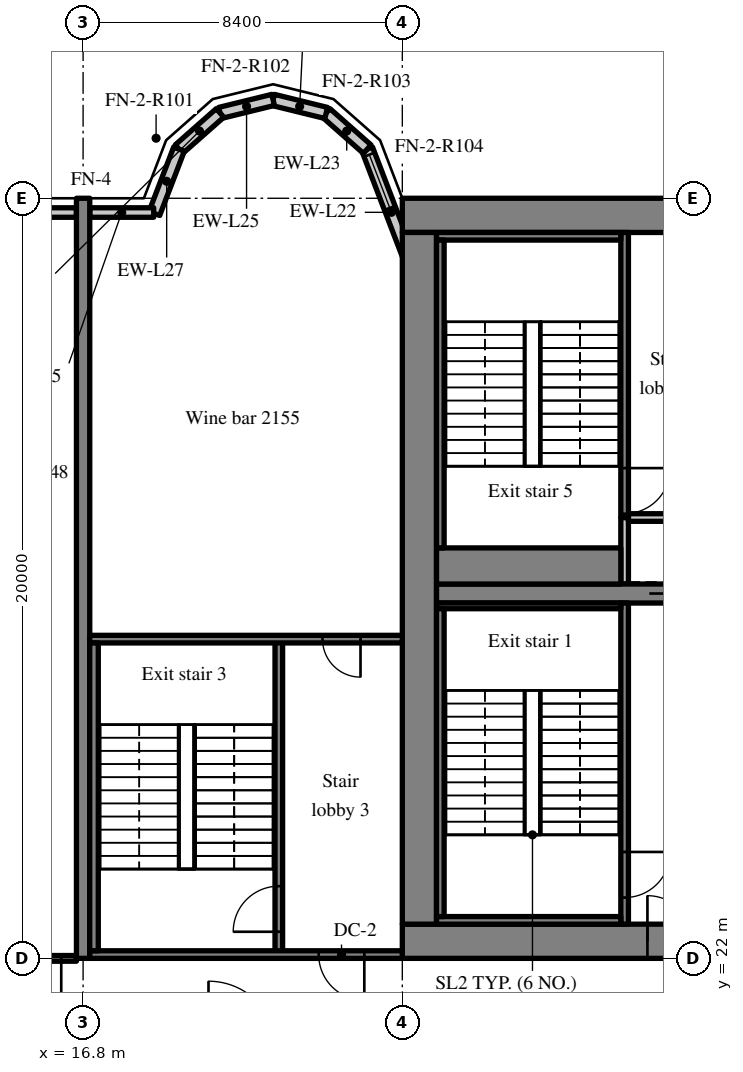
"""IFC4 building model, lengths in metres.
Left out: names, types, materials, properties, quantities, classifications, styles, units other than length and angle.
Written with IfcOpenShell. Run it as: python <this file> out.ifc"""

import sys

from ifc_helpers import new_model, si_unit, direction, frame, frame_2d, origin, place, context, subcontext, project, spatial, rectangle, extrude, source, transform, mapped, element, fill, save


model = new_model("IFC4")
c1 = context("Model", 3, precision=1e-05, world=origin(), true_north=direction((0.0, 1.0)))
c2 = subcontext(c1, "Body", "Model", "MODEL_VIEW")
j1 = project(units=[si_unit("LENGTHUNIT", "METRE"), si_unit("PLANEANGLEUNIT", "RADIAN")], contexts=[c1])
p1 = place(None, origin())
s1 = spatial("IfcSite", under=j1, at=p1, CompositionType="ELEMENT")
p2 = place(p1, origin())
s2 = spatial("IfcBuilding", under=s1, at=p2, CompositionType="ELEMENT")
p3 = place(p2, frame((0.0, 0.0, 91.4)))
s3 = spatial("IfcBuildingStorey", under=s2, at=p3, CompositionType="ELEMENT", Elevation=91.4)
m1 = source(origin(), c2, "Body", "SweptSolid", [
    extrude(rectangle(XDim=50.4, YDim=0.9, at=frame_2d((25.2, 0.0))), origin(), (0.0, 0.0, 1.0), 3.52),
])
p4 = place(p3, frame((25.2, 22.45, 0.0), z_axis=(0.0, 0.0, 1.0), x_axis=(1.0, 0.0, 0.0)))
e1 = element("IfcWall", 1, at=p4, inside=s3, PredefinedType="SHEAR", context=c2, shape_type="MappedRepresentation", body=[
    mapped(m1, transform((0.0, 0.0, 0.0), scale=1.0)),
])
m2 = source(origin(), c2, "Body", "SweptSolid", [
    extrude(rectangle(XDim=1.8, YDim=2.1, at=frame_2d((0.9, 1.05))), frame((0.0, 0.46, 0.0), z_axis=(0.0, -1.0, 0.0), x_axis=(1.0, 0.0, 0.0)), (0.0, 0.0, 1.0), 0.92),
])
p5 = place(p4, frame((15.9, 0.0, 0.0)))
e2 = element("IfcOpeningElement", 2, at=p5, cuts=e1, PredefinedType="OPENING", context=c2, shape_type="MappedRepresentation", body=[
    mapped(m2, transform((0.0, 0.0, 0.0), scale=1.0)),
])
m3 = source(origin(), c2, "Body", "SweptSolid", [
    extrude(rectangle(XDim=1.2, YDim=2.1, at=frame_2d((0.6, 1.05))), frame((0.0, 0.46, 0.0), z_axis=(0.0, -1.0, 0.0), x_axis=(1.0, 0.0, 0.0)), (0.0, 0.0, 1.0), 0.92),
])
p6 = place(p4, frame((26.975, 0.0, 0.0)))
e3 = element("IfcOpeningElement", 3, at=p6, cuts=e1, PredefinedType="OPENING", context=c2, shape_type="MappedRepresentation", body=[
    mapped(m3, transform((0.0, 0.0, 0.0), scale=1.0)),
])
m4 = source(origin(), c2, "Body", "SweptSolid", [
    extrude(rectangle(XDim=0.9, YDim=2.1, at=frame_2d((0.45, 1.05))), frame((0.0, 0.46, 0.0), z_axis=(0.0, -1.0, 0.0), x_axis=(1.0, 0.0, 0.0)), (0.0, 0.0, 1.0), 0.92),
])
p7 = place(p4, frame((34.5, 0.0, 0.0)))
e4 = element("IfcOpeningElement", 4, at=p7, cuts=e1, PredefinedType="OPENING", context=c2, shape_type="MappedRepresentation", body=[
    mapped(m4, transform((0.0, 0.0, 0.0), scale=1.0)),
])
p8 = place(p4, frame((31.5, 0.0, 0.0)))
e5 = element("IfcOpeningElement", 5, at=p8, cuts=e1, PredefinedType="OPENING", context=c2, shape_type="MappedRepresentation", body=[
    mapped(m4, transform((0.0, 0.0, 0.0), scale=1.0)),
])
p9 = place(p4, frame((39.788, 0.0, 0.0)))
e6 = element("IfcOpeningElement", 6, at=p9, cuts=e1, PredefinedType="OPENING", context=c2, shape_type="MappedRepresentation", body=[
    mapped(m4, transform((0.0, 0.0, 0.0), scale=1.0)),
])
p10 = place(p4, frame((36.762, 0.0, 0.0)))
e7 = element("IfcOpeningElement", 7, at=p10, cuts=e1, PredefinedType="OPENING", context=c2, shape_type="MappedRepresentation", body=[
    mapped(m4, transform((0.0, 0.0, 0.0), scale=1.0)),
])
p11 = place(p4, frame((6.45, 0.0, 0.0)))
e8 = element("IfcOpeningElement", 8, at=p11, cuts=e1, PredefinedType="OPENING", context=c2, shape_type="MappedRepresentation", body=[
    mapped(m3, transform((0.0, 0.0, 0.0), scale=1.0)),
])
p12 = place(p4, frame((47.775, 0.0, 0.0)))
e9 = element("IfcOpeningElement", 9, at=p12, cuts=e1, PredefinedType="OPENING", context=c2, shape_type="MappedRepresentation", body=[
    mapped(m3, transform((0.0, 0.0, 0.0), scale=1.0)),
])
p13 = place(p3, frame((25.2, 41.55, 0.0), z_axis=(0.0, 0.0, 1.0), x_axis=(1.0, 0.0, 0.0)))
e10 = element("IfcWall", 10, at=p13, inside=s3, PredefinedType="SHEAR", context=c2, shape_type="MappedRepresentation", body=[
    mapped(m1, transform((0.0, 0.0, 0.0), scale=1.0)),
])
m5 = source(origin(), c2, "Body", "SweptSolid", [
    extrude(rectangle(XDim=18.2, YDim=0.9, at=frame_2d((9.1, 0.0))), origin(), (0.0, 0.0, 1.0), 3.52),
])
p14 = place(p3, frame((25.65, 22.9, 0.0), z_axis=(0.0, 0.0, 1.0), x_axis=(0.0, 1.0, 0.0)))
e11 = element("IfcWall", 11, at=p14, inside=s3, PredefinedType="SHEAR", context=c2, shape_type="MappedRepresentation", body=[
    mapped(m5, transform((0.0, 0.0, 0.0), scale=1.0)),
])
m6 = source(origin(), c2, "Body", "SweptSolid", [
    extrude(rectangle(XDim=7.25, YDim=0.5, at=frame_2d((3.625, 0.0))), origin(), (0.0, 0.0, 1.0), 3.52),
])
p15 = place(p3, frame((26.1, 31.6, 0.0), z_axis=(0.0, 0.0, 1.0), x_axis=(1.0, 0.0, 0.0)))
e12 = element("IfcWall", 12, at=p15, inside=s3, PredefinedType="SHEAR", context=c2, shape_type="MappedRepresentation", body=[
    mapped(m6, transform((0.0, 0.0, 0.0), scale=1.0)),
])
m7 = source(origin(), c2, "Body", "SweptSolid", [
    extrude(rectangle(XDim=1.1, YDim=2.1, at=frame_2d((0.55, 1.05))), frame((0.0, 0.26, 0.0), z_axis=(0.0, -1.0, 0.0), x_axis=(1.0, 0.0, 0.0)), (0.0, 0.0, 1.0), 0.52),
])
p16 = place(p15, frame((5.6, 0.0, 0.0)))
e13 = element("IfcOpeningElement", 13, at=p16, cuts=e12, PredefinedType="OPENING", context=c2, shape_type="MappedRepresentation", body=[
    mapped(m7, transform((0.0, 0.0, 0.0), scale=1.0)),
])
m8 = source(origin(), c2, "Body", "SweptSolid", [
    extrude(rectangle(XDim=20.0, YDim=0.35, at=frame_2d((10.0, 0.0))), origin(), (0.0, 0.0, 1.0), 3.52),
])
p17 = place(p3, frame((16.8, 22.0, 0.0), z_axis=(0.0, 0.0, 1.0), x_axis=(0.0, 1.0, 0.0)))
e14 = element("IfcWall", 14, at=p17, inside=s3, PredefinedType="SHEAR", context=c2, shape_type="MappedRepresentation", body=[
    mapped(m8, transform((0.0, 0.0, 0.0), scale=1.0)),
])
m9 = source(origin(), c2, "Body", "SweptSolid", [
    extrude(rectangle(XDim=3.559, YDim=0.3, at=frame_2d((1.78, 0.0))), origin(), (0.0, 0.0, 1.0), 3.52),
])
p18 = place(p3, frame((25.55, 39.969, 0.0), z_axis=(0.0, 0.0, 1.0), x_axis=(-0.35779745313, 0.933799219604, 0.0)))
e15 = element("IfcWall", 15, at=p18, inside=s3, PredefinedType="SOLIDWALL", context=c2, shape_type="MappedRepresentation", body=[
    mapped(m9, transform((0.0, 0.0, 0.0), scale=1.0)),
])
m10 = source(origin(), c2, "Body", "SweptSolid", [
    extrude(rectangle(XDim=1.5, YDim=2.0, at=frame_2d((0.75, 1.0))), frame((0.0, 0.16, 0.0), z_axis=(0.0, -1.0, 0.0), x_axis=(1.0, 0.0, 0.0)), (0.0, 0.0, 1.0), 0.32),
])
p19 = place(p18, frame((1.903, 0.0, 0.9)))
e16 = element("IfcOpeningElement", 16, at=p19, cuts=e15, PredefinedType="OPENING", context=c2, shape_type="MappedRepresentation", body=[
    mapped(m10, transform((0.0, 0.0, 0.0), scale=1.0)),
])
m11 = source(origin(), c2, "Body", "SweptSolid", [
    extrude(rectangle(XDim=1.44, YDim=0.3, at=frame_2d((0.72, 0.0))), origin(), (0.0, 0.0, 1.0), 3.52),
])
p20 = place(p3, frame((24.277, 43.292, 0.0), z_axis=(0.0, 0.0, 1.0), x_axis=(-0.749649827867, 0.661834673902, 0.0)))
e17 = element("IfcWall", 17, at=p20, inside=s3, PredefinedType="SOLIDWALL", context=c2, shape_type="MappedRepresentation", body=[
    mapped(m11, transform((0.0, 0.0, 0.0), scale=1.0)),
])
m12 = source(origin(), c2, "Body", "SweptSolid", [
    extrude(rectangle(XDim=1.438, YDim=0.3, at=frame_2d((0.719, 0.0))), origin(), (0.0, 0.0, 1.0), 3.52),
])
p21 = place(p3, frame((23.197, 44.245, 0.0), z_axis=(0.0, 0.0, 1.0), x_axis=(-0.971152283879, 0.238460146601, 0.0)))
e18 = element("IfcWall", 18, at=p21, inside=s3, PredefinedType="SOLIDWALL", context=c2, shape_type="MappedRepresentation", body=[
    mapped(m12, transform((0.0, 0.0, 0.0), scale=1.0)),
])
m13 = source(origin(), c2, "Body", "SweptSolid", [
    extrude(rectangle(XDim=1.439, YDim=0.3, at=frame_2d((0.719, 0.0))), origin(), (0.0, 0.0, 1.0), 3.52),
])
p22 = place(p3, frame((21.8, 44.588, 0.0), z_axis=(0.0, 0.0, 1.0), x_axis=(-0.971161932466, -0.238420848351, 0.0)))
e19 = element("IfcWall", 19, at=p22, inside=s3, PredefinedType="SOLIDWALL", context=c2, shape_type="MappedRepresentation", body=[
    mapped(m13, transform((0.0, 0.0, 0.0), scale=1.0)),
])
m14 = source(origin(), c2, "Body", "SweptSolid", [
    extrude(rectangle(XDim=1.44, YDim=0.3, at=frame_2d((0.72, 0.0))), origin(), (0.0, 0.0, 1.0), 3.52),
])
p23 = place(p3, frame((20.403, 44.245, 0.0), z_axis=(0.0, 0.0, 1.0), x_axis=(-0.74957555648, -0.661918790432, 0.0)))
e20 = element("IfcWall", 20, at=p23, inside=s3, PredefinedType="SOLIDWALL", context=c2, shape_type="MappedRepresentation", body=[
    mapped(m14, transform((0.0, 0.0, 0.0), scale=1.0)),
])
m15 = source(origin(), c2, "Body", "SweptSolid", [
    extrude(rectangle(XDim=1.812, YDim=0.3, at=frame_2d((0.906, 0.0))), origin(), (0.0, 0.0, 1.0), 3.52),
])
p24 = place(p3, frame((19.323, 43.292, 0.0), z_axis=(0.0, 0.0, 1.0), x_axis=(-0.357877270961, -0.93376863244, 0.0)))
e21 = element("IfcWall", 21, at=p24, inside=s3, PredefinedType="SOLIDWALL", context=c2, shape_type="MappedRepresentation", body=[
    mapped(m15, transform((0.0, 0.0, 0.0), scale=1.0)),
])
m16 = source(origin(), c2, "Body", "SweptSolid", [
    extrude(rectangle(XDim=3.675, YDim=0.25, at=frame_2d((1.837, 0.0))), origin(), (0.0, 0.0, 1.0), 2.82),
])
p25 = place(p3, frame((16.625, 41.625, 0.0), z_axis=(0.0, 0.0, 1.0), x_axis=(-1.0, 0.0, 0.0)))
e22 = element("IfcWall", 22, at=p25, inside=s3, PredefinedType="SOLIDWALL", context=c2, shape_type="MappedRepresentation", body=[
    mapped(m16, transform((0.0, 0.0, 0.0), scale=1.0)),
])
m17 = source(origin(), c2, "Body", "SweptSolid", [
    extrude(rectangle(XDim=1.5, YDim=1.5, at=frame_2d((0.75, 0.75))), frame((0.0, 0.135, 0.0), z_axis=(0.0, -1.0, 0.0), x_axis=(1.0, 0.0, 0.0)), (0.0, 0.0, 1.0), 0.27),
])
p26 = place(p25, frame((1.087, 0.0, 0.9)))
e23 = element("IfcOpeningElement", 23, at=p26, cuts=e22, PredefinedType="OPENING", context=c2, shape_type="MappedRepresentation", body=[
    mapped(m17, transform((0.0, 0.0, 0.0), scale=1.0)),
])
m18 = source(origin(), c2, "Body", "SweptSolid", [
    extrude(rectangle(XDim=1.683, YDim=0.25, at=frame_2d((0.841, 0.0))), origin(), (0.0, 0.0, 1.0), 2.82),
])
p27 = place(p3, frame((18.658, 41.625, 0.0), z_axis=(0.0, 0.0, 1.0), x_axis=(-1.0, 0.0, 0.0)))
e24 = element("IfcWall", 24, at=p27, inside=s3, PredefinedType="SOLIDWALL", context=c2, shape_type="MappedRepresentation", body=[
    mapped(m18, transform((0.0, 0.0, 0.0), scale=1.0)),
])
m19 = source(origin(), c2, "Body", "SweptSolid", [
    extrude(rectangle(XDim=8.45, YDim=0.2, at=frame_2d((4.225, 0.0))), origin(), (0.0, 0.0, 1.0), 3.52),
])
p28 = place(p3, frame((31.05, 22.9, 0.0), z_axis=(0.0, 0.0, 1.0), x_axis=(0.0, 1.0, 0.0)))
e25 = element("IfcWall", 25, at=p28, inside=s3, PredefinedType="SOLIDWALL", context=c2, shape_type="MappedRepresentation", body=[
    mapped(m19, transform((0.0, 0.0, 0.0), scale=1.0)),
])
m20 = source(origin(), c2, "Body", "SweptSolid", [
    extrude(rectangle(XDim=1.2, YDim=2.1, at=frame_2d((0.6, 1.05))), frame((0.0, 0.11, 0.0), z_axis=(0.0, -1.0, 0.0), x_axis=(1.0, 0.0, 0.0)), (0.0, 0.0, 1.0), 0.22),
])
p29 = place(p28, frame((0.7, 0.0, 0.0)))
e26 = element("IfcOpeningElement", 26, at=p29, cuts=e25, PredefinedType="OPENING", context=c2, shape_type="MappedRepresentation", body=[
    mapped(m20, transform((0.0, 0.0, 0.0), scale=1.0)),
])
m21 = source(origin(), c2, "Body", "SweptSolid", [
    extrude(rectangle(XDim=1.75, YDim=0.2, at=frame_2d((0.875, 0.0))), origin(), (0.0, 0.0, 1.0), 3.52),
])
p30 = place(p3, frame((31.05, 31.85, 0.0), z_axis=(0.0, 0.0, 1.0), x_axis=(0.0, 1.0, 0.0)))
e27 = element("IfcWall", 27, at=p30, inside=s3, PredefinedType="SOLIDWALL", context=c2, shape_type="MappedRepresentation", body=[
    mapped(m21, transform((0.0, 0.0, 0.0), scale=1.0)),
])
m22 = source(origin(), c2, "Body", "SweptSolid", [
    extrude(rectangle(XDim=2.2, YDim=0.2, at=frame_2d((1.1, 0.0))), origin(), (0.0, 0.0, 1.0), 3.52),
])
p31 = place(p3, frame((31.15, 33.6, 0.0), z_axis=(0.0, 0.0, 1.0), x_axis=(1.0, 0.0, 0.0)))
e28 = element("IfcWall", 28, at=p31, inside=s3, PredefinedType="SOLIDWALL", context=c2, shape_type="MappedRepresentation", body=[
    mapped(m22, transform((0.0, 0.0, 0.0), scale=1.0)),
])
m23 = source(origin(), c2, "Body", "SweptSolid", [
    extrude(rectangle(XDim=7.5, YDim=0.2, at=frame_2d((3.75, 0.0))), origin(), (0.0, 0.0, 1.0), 3.52),
])
p32 = place(p3, frame((31.05, 33.6, 0.0), z_axis=(0.0, 0.0, 1.0), x_axis=(0.0, 1.0, 0.0)))
e29 = element("IfcWall", 29, at=p32, inside=s3, PredefinedType="SOLIDWALL", context=c2, shape_type="MappedRepresentation", body=[
    mapped(m23, transform((0.0, 0.0, 0.0), scale=1.0)),
])
p33 = place(p32, frame((0.1, 0.0, 0.0)))
e30 = element("IfcOpeningElement", 30, at=p33, cuts=e29, PredefinedType="OPENING", context=c2, shape_type="MappedRepresentation", body=[
    mapped(m20, transform((0.0, 0.0, 0.0), scale=1.0)),
])
m24 = source(origin(), c2, "Body", "SweptSolid", [
    extrude(rectangle(XDim=8.3, YDim=0.2, at=frame_2d((4.15, 0.0))), origin(), (0.0, 0.0, 1.0), 3.52),
])
p34 = place(p3, frame((21.95, 22.1, 0.0), z_axis=(0.0, 0.0, 1.0), x_axis=(0.0, 1.0, 0.0)))
e31 = element("IfcWall", 31, at=p34, inside=s3, PredefinedType="SOLIDWALL", context=c2, shape_type="MappedRepresentation", body=[
    mapped(m24, transform((0.0, 0.0, 0.0), scale=1.0)),
])
p35 = place(p34, frame((0.6, 0.0, 0.0)))
e32 = element("IfcOpeningElement", 32, at=p35, cuts=e31, PredefinedType="OPENING", context=c2, shape_type="MappedRepresentation", body=[
    mapped(m20, transform((0.0, 0.0, 0.0), scale=1.0)),
])
m25 = source(origin(), c2, "Body", "SweptSolid", [
    extrude(rectangle(XDim=8.225, YDim=0.2, at=frame_2d((4.112, 0.0))), origin(), (0.0, 0.0, 1.0), 3.52),
])
p36 = place(p3, frame((16.975, 22.1, 0.0), z_axis=(0.0, 0.0, 1.0), x_axis=(1.0, 0.0, 0.0)))
e33 = element("IfcWall", 33, at=p36, inside=s3, PredefinedType="SOLIDWALL", context=c2, shape_type="MappedRepresentation", body=[
    mapped(m25, transform((0.0, 0.0, 0.0), scale=1.0)),
])
p37 = place(p36, frame((6.025, 0.0, 0.0)))
e34 = element("IfcOpeningElement", 34, at=p37, cuts=e33, PredefinedType="OPENING", context=c2, shape_type="MappedRepresentation", body=[
    mapped(m20, transform((0.0, 0.0, 0.0), scale=1.0)),
])
p38 = place(p3, frame((16.975, 30.4, 0.0), z_axis=(0.0, 0.0, 1.0), x_axis=(1.0, 0.0, 0.0)))
e35 = element("IfcWall", 35, at=p38, inside=s3, PredefinedType="SOLIDWALL", context=c2, shape_type="MappedRepresentation", body=[
    mapped(m25, transform((0.0, 0.0, 0.0), scale=1.0)),
])
m26 = source(origin(), c2, "Body", "SweptSolid", [
    extrude(rectangle(XDim=1.0, YDim=2.1, at=frame_2d((0.5, 1.05))), frame((0.0, 0.11, 0.0), z_axis=(0.0, -1.0, 0.0), x_axis=(1.0, 0.0, 0.0)), (0.0, 0.0, 1.0), 0.22),
])
p39 = place(p38, frame((6.125, 0.0, 0.0)))
e36 = element("IfcOpeningElement", 36, at=p39, cuts=e35, PredefinedType="OPENING", context=c2, shape_type="MappedRepresentation", body=[
    mapped(m26, transform((0.0, 0.0, 0.0), scale=1.0)),
])
m27 = source(origin(), c2, "Body", "SweptSolid", [
    extrude(rectangle(XDim=4.85, YDim=0.2, at=frame_2d((2.425, 0.0))), origin(), (0.0, 0.0, 1.0), 3.52),
])
p40 = place(p3, frame((26.1, 23.0, 0.0), z_axis=(0.0, 0.0, 1.0), x_axis=(1.0, 0.0, 0.0)))
e37 = element("IfcWall", 37, at=p40, inside=s3, PredefinedType="SOLIDWALL", context=c2, shape_type="MappedRepresentation", body=[
    mapped(m27, transform((0.0, 0.0, 0.0), scale=1.0)),
])
m28 = source(origin(), c2, "Body", "SweptSolid", [
    extrude(rectangle(XDim=4.85, YDim=0.15, at=frame_2d((2.425, 0.0))), origin(), (0.0, 0.0, 1.0), 3.52),
])
p41 = place(p3, frame((26.1, 31.275, 0.0), z_axis=(0.0, 0.0, 1.0), x_axis=(1.0, 0.0, 0.0)))
e38 = element("IfcWall", 38, at=p41, inside=s3, PredefinedType="SOLIDWALL", context=c2, shape_type="MappedRepresentation", body=[
    mapped(m28, transform((0.0, 0.0, 0.0), scale=1.0)),
])
m29 = source(origin(), c2, "Body", "SweptSolid", [
    extrude(rectangle(XDim=8.1, YDim=0.2, at=frame_2d((4.05, 0.0))), origin(), (0.0, 0.0, 1.0), 3.52),
])
p42 = place(p3, frame((26.2, 23.1, 0.0), z_axis=(0.0, 0.0, 1.0), x_axis=(0.0, 1.0, 0.0)))
e39 = element("IfcWall", 39, at=p42, inside=s3, PredefinedType="SOLIDWALL", context=c2, shape_type="MappedRepresentation", body=[
    mapped(m29, transform((0.0, 0.0, 0.0), scale=1.0)),
])
m30 = source(origin(), c2, "Body", "SweptSolid", [
    extrude(rectangle(XDim=8.1, YDim=0.225, at=frame_2d((4.05, 0.0))), origin(), (0.0, 0.0, 1.0), 3.52),
])
p43 = place(p3, frame((17.087, 22.2, 0.0), z_axis=(0.0, 0.0, 1.0), x_axis=(0.0, 1.0, 0.0)))
e40 = element("IfcWall", 40, at=p43, inside=s3, PredefinedType="SOLIDWALL", context=c2, shape_type="MappedRepresentation", body=[
    mapped(m30, transform((0.0, 0.0, 0.0), scale=1.0)),
])
p44 = place(p3, frame((26.1, 41.0, 0.0), z_axis=(0.0, 0.0, 1.0), x_axis=(1.0, 0.0, 0.0)))
e41 = element("IfcWall", 41, at=p44, inside=s3, PredefinedType="SOLIDWALL", context=c2, shape_type="MappedRepresentation", body=[
    mapped(m27, transform((0.0, 0.0, 0.0), scale=1.0)),
])
m31 = source(origin(), c2, "Body", "SweptSolid", [
    extrude(rectangle(XDim=4.85, YDim=0.95, at=frame_2d((2.425, 0.0))), origin(), (0.0, 0.0, 1.0), 3.52),
])
p45 = place(p3, frame((26.1, 32.325, 0.0), z_axis=(0.0, 0.0, 1.0), x_axis=(1.0, 0.0, 0.0)))
e42 = element("IfcWall", 42, at=p45, inside=s3, PredefinedType="SOLIDWALL", context=c2, shape_type="MappedRepresentation", body=[
    mapped(m31, transform((0.0, 0.0, 0.0), scale=1.0)),
])
p46 = place(p3, frame((26.2, 32.8, 0.0), z_axis=(0.0, 0.0, 1.0), x_axis=(0.0, 1.0, 0.0)))
e43 = element("IfcWall", 43, at=p46, inside=s3, PredefinedType="SOLIDWALL", context=c2, shape_type="MappedRepresentation", body=[
    mapped(m29, transform((0.0, 0.0, 0.0), scale=1.0)),
])
m32 = source(origin(), c2, "Body", "SweptSolid", [
    extrude(rectangle(XDim=3.95, YDim=0.15, at=frame_2d((1.975, 0.0))), origin(), (0.0, 0.0, 1.0), 2.82),
])
p47 = place(p3, frame((12.675, 22.0, 0.0), z_axis=(0.0, 0.0, 1.0), x_axis=(1.0, 0.0, 0.0)))
e44 = element("IfcWall", 44, at=p47, inside=s3, PredefinedType="PARTITIONING", context=c2, shape_type="MappedRepresentation", body=[
    mapped(m32, transform((0.0, 0.0, 0.0), scale=1.0)),
])
m33 = source(origin(), c2, "Body", "SweptSolid", [
    extrude(rectangle(XDim=1.0, YDim=2.1, at=frame_2d((0.5, 1.05))), frame((0.0, 0.085, 0.0), z_axis=(0.0, -1.0, 0.0), x_axis=(1.0, 0.0, 0.0)), (0.0, 0.0, 1.0), 0.17),
])
p48 = place(p47, frame((2.55, 0.0, 0.0)))
e45 = element("IfcOpeningElement", 45, at=p48, cuts=e44, PredefinedType="OPENING", context=c2, shape_type="MappedRepresentation", body=[
    mapped(m33, transform((0.0, 0.0, 0.0), scale=1.0)),
])
m34 = source(origin(), c2, "Body", "SweptSolid", [
    extrude(rectangle(XDim=1.5, YDim=2.0, at=frame_2d((0.75, 1.0))), frame((0.0, 0.03, 0.0), z_axis=(0.0, -1.0, 0.0), x_axis=(1.0, 0.0, 0.0)), (0.0, 0.0, 1.0), 0.06),
])
p49 = place(p19, origin())
e46 = element("IfcWindow", 46, at=p49, inside=s3, PartitioningType="SINGLE_PANEL", PredefinedType="WINDOW", context=c2, shape_type="MappedRepresentation", body=[
    mapped(m34, transform((0.0, 0.0, 0.0), scale=1.0)),
])
fill(e16, e46)
m35 = source(origin(), c2, "Body", "SweptSolid", [
    extrude(rectangle(XDim=1.2, YDim=2.1, at=frame_2d((0.6, 1.05))), frame((0.0, 0.025, 0.0), z_axis=(0.0, -1.0, 0.0), x_axis=(1.0, 0.0, 0.0)), (0.0, 0.0, 1.0), 0.05),
])
p50 = place(p29, origin())
e47 = element("IfcDoor", 47, at=p50, inside=s3, OperationType="SINGLE_SWING_RIGHT", PredefinedType="DOOR", context=c2, shape_type="MappedRepresentation", body=[
    mapped(m35, transform((0.0, 0.0, 0.0), scale=1.0)),
])
fill(e26, e47)
m36 = source(origin(), c2, "Body", "SweptSolid", [
    extrude(rectangle(XDim=1.2, YDim=2.1, at=frame_2d((0.6, 1.05))), frame((0.0, 0.375, 0.0), z_axis=(0.0, -1.0, 0.0), x_axis=(1.0, 0.0, 0.0)), (0.0, 0.0, 1.0), 0.05),
])
p51 = place(p11, origin())
e48 = element("IfcDoor", 48, at=p51, inside=s3, OperationType="SINGLE_SWING_LEFT", PredefinedType="DOOR", context=c2, shape_type="MappedRepresentation", body=[
    mapped(m36, transform((0.0, 0.0, 0.0), scale=1.0)),
])
fill(e8, e48)
m37 = source(origin(), c2, "Body", "SweptSolid", [
    extrude(rectangle(XDim=1.1, YDim=2.1, at=frame_2d((0.55, 1.05))), frame((0.0, 0.025, 0.0), z_axis=(0.0, -1.0, 0.0), x_axis=(1.0, 0.0, 0.0)), (0.0, 0.0, 1.0), 0.05),
])
p52 = place(p16, origin())
e49 = element("IfcDoor", 49, at=p52, inside=s3, OperationType="SLIDING_TO_RIGHT", PredefinedType="DOOR", context=c2, shape_type="MappedRepresentation", body=[
    mapped(m37, transform((0.0, 0.0, 0.0), scale=1.0)),
])
fill(e13, e49)
p53 = place(p33, origin())
e50 = element("IfcDoor", 50, at=p53, inside=s3, OperationType="SINGLE_SWING_RIGHT", PredefinedType="DOOR", context=c2, shape_type="MappedRepresentation", body=[
    mapped(m35, transform((0.0, 0.0, 0.0), scale=1.0)),
])
fill(e30, e50)
p54 = place(p35, origin())
e51 = element("IfcDoor", 51, at=p54, inside=s3, OperationType="SINGLE_SWING_LEFT", PredefinedType="DOOR", context=c2, shape_type="MappedRepresentation", body=[
    mapped(m35, transform((0.0, 0.0, 0.0), scale=1.0)),
])
fill(e32, e51)
p55 = place(p37, origin())
e52 = element("IfcDoor", 52, at=p55, inside=s3, OperationType="SINGLE_SWING_RIGHT", PredefinedType="DOOR", context=c2, shape_type="MappedRepresentation", body=[
    mapped(m35, transform((0.0, 0.0, 0.0), scale=1.0)),
])
fill(e34, e52)
m38 = source(origin(), c2, "Body", "SweptSolid", [
    extrude(rectangle(XDim=1.0, YDim=2.1, at=frame_2d((0.5, 1.05))), frame((0.0, 0.025, 0.0), z_axis=(0.0, -1.0, 0.0), x_axis=(1.0, 0.0, 0.0)), (0.0, 0.0, 1.0), 0.05),
])
p56 = place(p39, origin())
e53 = element("IfcDoor", 53, at=p56, inside=s3, OperationType="SINGLE_SWING_RIGHT", PredefinedType="DOOR", context=c2, shape_type="MappedRepresentation", body=[
    mapped(m38, transform((0.0, 0.0, 0.0), scale=1.0)),
])
fill(e36, e53)
p57 = place(p48, origin())
e54 = element("IfcDoor", 54, at=p57, inside=s3, OperationType="SINGLE_SWING_RIGHT", PredefinedType="DOOR", context=c2, shape_type="MappedRepresentation", body=[
    mapped(m38, transform((0.0, 0.0, 0.0), scale=1.0)),
])
fill(e45, e54)
save(model, sys.argv[1])
